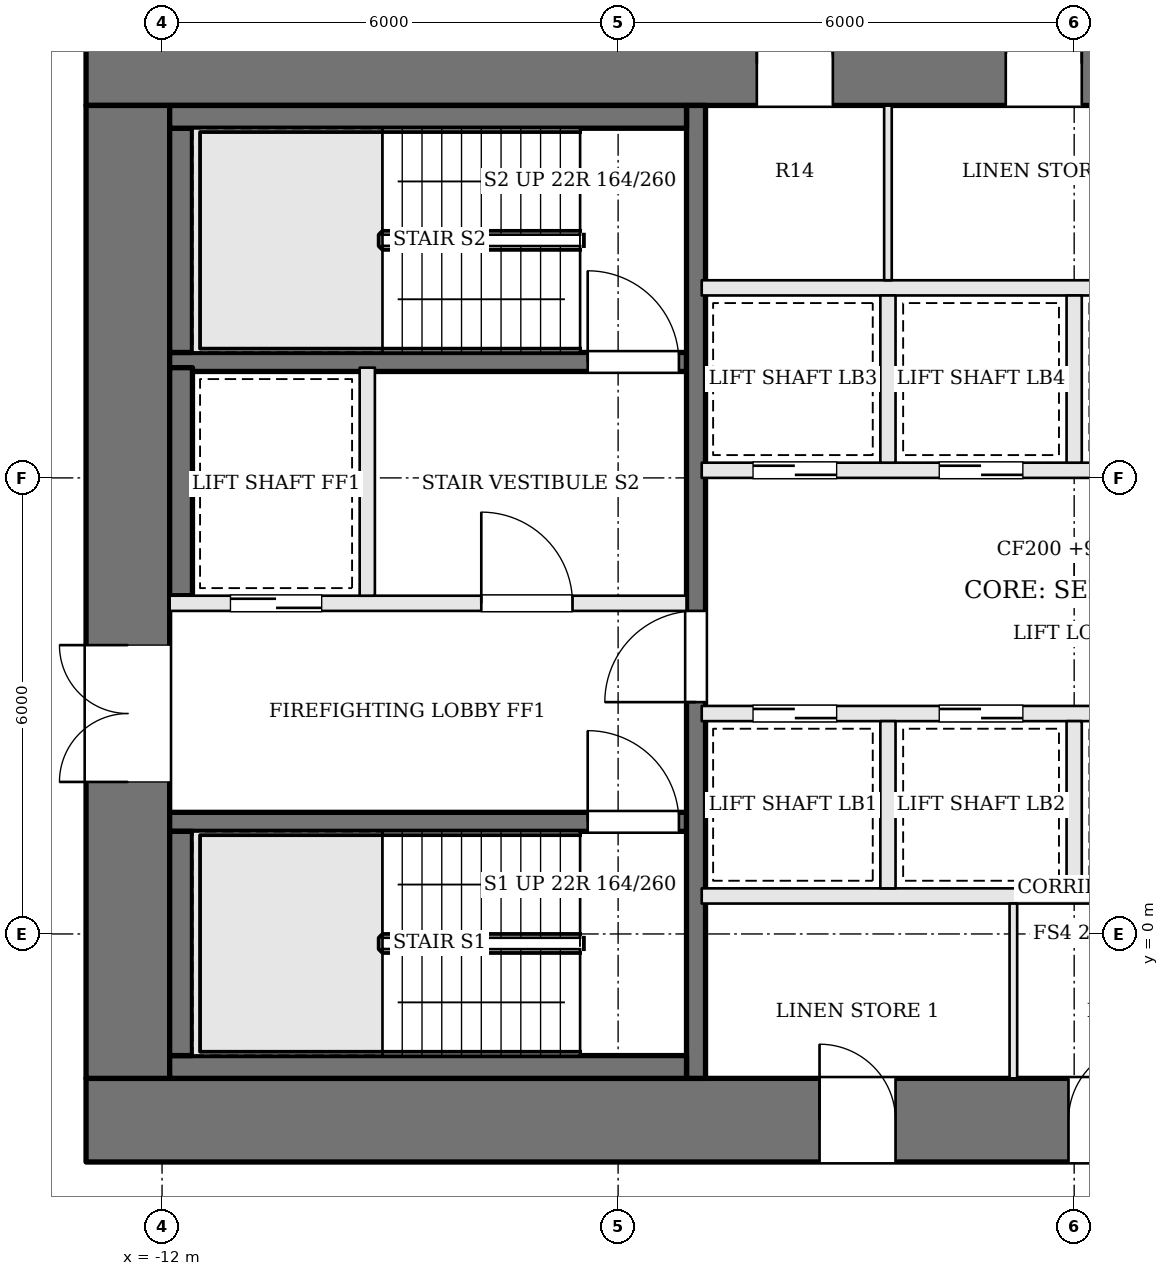
"""IFC4 building model, lengths in metres.
Left out: names, types, materials, properties, quantities, classifications, styles, units other than length and angle.
Written with IfcOpenShell. Run it as: python <this file> out.ifc"""

import sys

from ifc_helpers import new_model, si_unit, direction, frame, frame_2d, origin, place, context, subcontext, project, spatial, rectangle, extrude, element, fill, save


model = new_model("IFC4")
c1 = context("Model", 3, precision=1e-05, world=origin(), true_north=direction((0.0, 1.0)))
c2 = subcontext(c1, "Body", "Model", "MODEL_VIEW")
j1 = project(units=[si_unit("LENGTHUNIT", "METRE"), si_unit("PLANEANGLEUNIT", "RADIAN")], contexts=[c1])
p1 = place(None, origin())
s1 = spatial("IfcSite", under=j1, at=p1, CompositionType="ELEMENT")
p2 = place(p1, origin())
s2 = spatial("IfcBuilding", under=s1, at=p2, CompositionType="ELEMENT")
p3 = place(p2, frame((0.0, 0.0, 99.6)))
s3 = spatial("IfcBuildingStorey", under=s2, at=p3, CompositionType="ELEMENT", Elevation=99.6)
p4 = place(p3, frame((-13.0, 11.45, 0.0), z_axis=(0.0, 0.0, 1.0), x_axis=(1.0, 0.0, 0.0)))
e1 = element("IfcWall", 1, at=p4, inside=s3, PredefinedType="SHEAR", context=c2, shape_type="SweptSolid", body=[
    extrude(rectangle(XDim=26.0, YDim=1.1, at=frame_2d((13.0, 0.0))), origin(), (0.0, 0.0, 1.0), 3.6),
])
p5 = place(p4, frame((8.825, 0.0, 0.0)))
e2 = element("IfcOpeningElement", 2, at=p5, cuts=e1, PredefinedType="OPENING", context=c2, shape_type="SweptSolid", body=[
    extrude(rectangle(XDim=1.0, YDim=2.1, at=frame_2d((0.5, 1.05))), frame((0.0, 0.56, 0.0), z_axis=(0.0, -1.0, 0.0), x_axis=(1.0, 0.0, 0.0)), (0.0, 0.0, 1.0), 1.12),
])
p6 = place(p4, frame((12.1, 0.0, 0.0)))
e3 = element("IfcOpeningElement", 3, at=p6, cuts=e1, PredefinedType="OPENING", context=c2, shape_type="SweptSolid", body=[
    extrude(rectangle(XDim=1.0, YDim=2.1, at=frame_2d((0.5, 1.05))), frame((0.0, 0.56, 0.0), z_axis=(0.0, -1.0, 0.0), x_axis=(1.0, 0.0, 0.0)), (0.0, 0.0, 1.0), 1.12),
])
p7 = place(p4, frame((15.125, 0.0, 0.0)))
e4 = element("IfcOpeningElement", 4, at=p7, cuts=e1, PredefinedType="OPENING", context=c2, shape_type="SweptSolid", body=[
    extrude(rectangle(XDim=0.7, YDim=2.1, at=frame_2d((0.35, 1.05))), frame((0.0, 0.56, 0.0), z_axis=(0.0, -1.0, 0.0), x_axis=(1.0, 0.0, 0.0)), (0.0, 0.0, 1.0), 1.12),
])
p8 = place(p4, frame((16.65, 0.0, 0.0)))
e5 = element("IfcOpeningElement", 5, at=p8, cuts=e1, PredefinedType="OPENING", context=c2, shape_type="SweptSolid", body=[
    extrude(rectangle(XDim=0.9, YDim=2.1, at=frame_2d((0.45, 1.05))), frame((0.0, 0.56, 0.0), z_axis=(0.0, -1.0, 0.0), x_axis=(1.0, 0.0, 0.0)), (0.0, 0.0, 1.0), 1.12),
])
p9 = place(p3, frame((-13.0, -2.45, 0.0), z_axis=(0.0, 0.0, 1.0), x_axis=(1.0, 0.0, 0.0)))
e6 = element("IfcWall", 6, at=p9, inside=s3, PredefinedType="SHEAR", context=c2, shape_type="SweptSolid", body=[
    extrude(rectangle(XDim=26.0, YDim=1.1, at=frame_2d((13.0, 0.0))), origin(), (0.0, 0.0, 1.0), 3.6),
])
p10 = place(p9, frame((9.65, 0.0, 0.0)))
e7 = element("IfcOpeningElement", 7, at=p10, cuts=e6, PredefinedType="OPENING", context=c2, shape_type="SweptSolid", body=[
    extrude(rectangle(XDim=1.0, YDim=2.1, at=frame_2d((0.5, 1.05))), frame((0.0, 0.56, 0.0), z_axis=(0.0, -1.0, 0.0), x_axis=(1.0, 0.0, 0.0)), (0.0, 0.0, 1.0), 1.12),
])
p11 = place(p9, frame((12.925, 0.0, 0.0)))
e8 = element("IfcOpeningElement", 8, at=p11, cuts=e6, PredefinedType="OPENING", context=c2, shape_type="SweptSolid", body=[
    extrude(rectangle(XDim=1.0, YDim=2.1, at=frame_2d((0.5, 1.05))), frame((0.0, 0.56, 0.0), z_axis=(0.0, -1.0, 0.0), x_axis=(1.0, 0.0, 0.0)), (0.0, 0.0, 1.0), 1.12),
])
p12 = place(p9, frame((15.125, 0.0, 0.0)))
e9 = element("IfcOpeningElement", 9, at=p12, cuts=e6, PredefinedType="OPENING", context=c2, shape_type="SweptSolid", body=[
    extrude(rectangle(XDim=0.7, YDim=2.1, at=frame_2d((0.35, 1.05))), frame((0.0, 0.56, 0.0), z_axis=(0.0, -1.0, 0.0), x_axis=(1.0, 0.0, 0.0)), (0.0, 0.0, 1.0), 1.12),
])
p13 = place(p9, frame((16.5, 0.0, 0.0)))
e10 = element("IfcOpeningElement", 10, at=p13, cuts=e6, PredefinedType="OPENING", context=c2, shape_type="SweptSolid", body=[
    extrude(rectangle(XDim=1.0, YDim=2.1, at=frame_2d((0.5, 1.05))), frame((0.0, 0.56, 0.0), z_axis=(0.0, -1.0, 0.0), x_axis=(1.0, 0.0, 0.0)), (0.0, 0.0, 1.0), 1.12),
])
p14 = place(p3, frame((-12.45, -1.9, 0.0), z_axis=(0.0, 0.0, 1.0), x_axis=(0.0, 1.0, 0.0)))
e11 = element("IfcWall", 11, at=p14, inside=s3, PredefinedType="SHEAR", context=c2, shape_type="SweptSolid", body=[
    extrude(rectangle(XDim=12.8, YDim=1.1, at=frame_2d((6.4, 0.0))), origin(), (0.0, 0.0, 1.0), 3.6),
])
p15 = place(p14, frame((3.9, 0.0, 0.0)))
e12 = element("IfcOpeningElement", 12, at=p15, cuts=e11, PredefinedType="OPENING", context=c2, shape_type="SweptSolid", body=[
    extrude(rectangle(XDim=1.8, YDim=2.1, at=frame_2d((0.9, 1.05))), frame((0.0, 0.56, 0.0), z_axis=(0.0, -1.0, 0.0), x_axis=(1.0, 0.0, 0.0)), (0.0, 0.0, 1.0), 1.12),
])
p16 = place(p3, frame((-11.9, 1.475, 0.0), z_axis=(0.0, 0.0, 1.0), x_axis=(1.0, 0.0, 0.0)))
e13 = element("IfcWall", 13, at=p16, inside=s3, PredefinedType="SOLIDWALL", context=c2, shape_type="SweptSolid", body=[
    extrude(rectangle(XDim=6.8, YDim=0.25, at=frame_2d((3.4, 0.0))), origin(), (0.0, 0.0, 1.0), 3.4),
])
p17 = place(p16, frame((5.5, 0.0, 0.0)))
e14 = element("IfcOpeningElement", 14, at=p17, cuts=e13, PredefinedType="OPENING", context=c2, shape_type="SweptSolid", body=[
    extrude(rectangle(XDim=1.2, YDim=2.1, at=frame_2d((0.6, 1.05))), frame((0.0, 0.135, 0.0), z_axis=(0.0, -1.0, 0.0), x_axis=(1.0, 0.0, 0.0)), (0.0, 0.0, 1.0), 0.27),
])
p18 = place(p3, frame((-11.9, 4.35, 0.0), z_axis=(0.0, 0.0, 1.0), x_axis=(1.0, 0.0, 0.0)))
e15 = element("IfcWall", 15, at=p18, inside=s3, PredefinedType="SOLIDWALL", context=c2, shape_type="SweptSolid", body=[
    extrude(rectangle(XDim=6.8, YDim=0.2, at=frame_2d((3.4, 0.0))), origin(), (0.0, 0.0, 1.0), 3.4),
])
p19 = place(p18, frame((4.1, 0.0, 0.0)))
e16 = element("IfcOpeningElement", 16, at=p19, cuts=e15, PredefinedType="OPENING", context=c2, shape_type="SweptSolid", body=[
    extrude(rectangle(XDim=1.2, YDim=2.1, at=frame_2d((0.6, 1.05))), frame((0.0, 0.11, 0.0), z_axis=(0.0, -1.0, 0.0), x_axis=(1.0, 0.0, 0.0)), (0.0, 0.0, 1.0), 0.22),
])
p20 = place(p18, frame((0.8, 0.0, 0.0)))
e17 = element("IfcOpeningElement", 17, at=p20, cuts=e15, PredefinedType="OPENING", context=c2, shape_type="SweptSolid", body=[
    extrude(rectangle(XDim=1.2, YDim=2.1, at=frame_2d((0.6, 1.05))), frame((0.0, 0.11, 0.0), z_axis=(0.0, -1.0, 0.0), x_axis=(1.0, 0.0, 0.0)), (0.0, 0.0, 1.0), 0.22),
])
p21 = place(p3, frame((-11.9, 7.525, 0.0), z_axis=(0.0, 0.0, 1.0), x_axis=(1.0, 0.0, 0.0)))
e18 = element("IfcWall", 18, at=p21, inside=s3, PredefinedType="SOLIDWALL", context=c2, shape_type="SweptSolid", body=[
    extrude(rectangle(XDim=6.8, YDim=0.25, at=frame_2d((3.4, 0.0))), origin(), (0.0, 0.0, 1.0), 3.4),
])
p22 = place(p21, frame((5.5, 0.0, 0.0)))
e19 = element("IfcOpeningElement", 19, at=p22, cuts=e18, PredefinedType="OPENING", context=c2, shape_type="SweptSolid", body=[
    extrude(rectangle(XDim=1.2, YDim=2.1, at=frame_2d((0.6, 1.05))), frame((0.0, 0.135, 0.0), z_axis=(0.0, -1.0, 0.0), x_axis=(1.0, 0.0, 0.0)), (0.0, 0.0, 1.0), 0.27),
])
p23 = place(p3, frame((-9.3, 4.45, 0.0), z_axis=(0.0, 0.0, 1.0), x_axis=(0.0, 1.0, 0.0)))
e20 = element("IfcWall", 20, at=p23, inside=s3, PredefinedType="SOLIDWALL", context=c2, shape_type="SweptSolid", body=[
    extrude(rectangle(XDim=3.0, YDim=0.2, at=frame_2d((1.5, 0.0))), origin(), (0.0, 0.0, 1.0), 3.4),
])
p24 = place(p3, frame((-4.975, -1.9, 0.0), z_axis=(0.0, 0.0, 1.0), x_axis=(0.0, 1.0, 0.0)))
e21 = element("IfcWall", 21, at=p24, inside=s3, PredefinedType="SOLIDWALL", context=c2, shape_type="SweptSolid", body=[
    extrude(rectangle(XDim=12.8, YDim=0.25, at=frame_2d((6.4, 0.0))), origin(), (0.0, 0.0, 1.0), 3.4),
])
p25 = place(p24, frame((4.95, 0.0, 0.0)))
e22 = element("IfcOpeningElement", 22, at=p25, cuts=e21, PredefinedType="OPENING", context=c2, shape_type="SweptSolid", body=[
    extrude(rectangle(XDim=1.2, YDim=2.1, at=frame_2d((0.6, 1.05))), frame((0.0, 0.135, 0.0), z_axis=(0.0, -1.0, 0.0), x_axis=(1.0, 0.0, 0.0)), (0.0, 0.0, 1.0), 0.27),
])
p26 = place(p3, frame((-11.9, -1.75, 0.0), z_axis=(0.0, 0.0, 1.0), x_axis=(1.0, 0.0, 0.0)))
e23 = element("IfcWall", 23, at=p26, inside=s3, PredefinedType="SOLIDWALL", context=c2, shape_type="SweptSolid", body=[
    extrude(rectangle(XDim=6.8, YDim=0.3, at=frame_2d((3.4, 0.0))), origin(), (0.0, 0.0, 1.0), 3.4),
])
p27 = place(p3, frame((-11.75, -1.6, 0.0), z_axis=(0.0, 0.0, 1.0), x_axis=(0.0, 1.0, 0.0)))
e24 = element("IfcWall", 24, at=p27, inside=s3, PredefinedType="SOLIDWALL", context=c2, shape_type="SweptSolid", body=[
    extrude(rectangle(XDim=2.95, YDim=0.3, at=frame_2d((1.475, 0.0))), origin(), (0.0, 0.0, 1.0), 3.4),
])
p28 = place(p3, frame((-11.75, 4.45, 0.0), z_axis=(0.0, 0.0, 1.0), x_axis=(0.0, 1.0, 0.0)))
e25 = element("IfcWall", 25, at=p28, inside=s3, PredefinedType="SOLIDWALL", context=c2, shape_type="SweptSolid", body=[
    extrude(rectangle(XDim=3.0, YDim=0.3, at=frame_2d((1.5, 0.0))), origin(), (0.0, 0.0, 1.0), 3.4),
])
p29 = place(p3, frame((-11.75, 7.65, 0.0), z_axis=(0.0, 0.0, 1.0), x_axis=(0.0, 1.0, 0.0)))
e26 = element("IfcWall", 26, at=p29, inside=s3, PredefinedType="SOLIDWALL", context=c2, shape_type="SweptSolid", body=[
    extrude(rectangle(XDim=2.95, YDim=0.3, at=frame_2d((1.475, 0.0))), origin(), (0.0, 0.0, 1.0), 3.4),
])
p30 = place(p3, frame((-11.9, 10.75, 0.0), z_axis=(0.0, 0.0, 1.0), x_axis=(1.0, 0.0, 0.0)))
e27 = element("IfcWall", 27, at=p30, inside=s3, PredefinedType="SOLIDWALL", context=c2, shape_type="SweptSolid", body=[
    extrude(rectangle(XDim=6.8, YDim=0.3, at=frame_2d((3.4, 0.0))), origin(), (0.0, 0.0, 1.0), 3.4),
])
p31 = place(p3, frame((-4.9, 0.5, 0.0), z_axis=(0.0, 0.0, 1.0), x_axis=(1.0, 0.0, 0.0)))
e28 = element("IfcWall", 28, at=p31, inside=s3, PredefinedType="SOLIDWALL", context=c2, shape_type="SweptSolid", body=[
    extrude(rectangle(XDim=9.8, YDim=0.2, at=frame_2d((4.9, 0.0))), origin(), (0.0, 0.0, 1.0), 3.4),
])
p32 = place(p3, frame((-4.9, 2.9, 0.0), z_axis=(0.0, 0.0, 1.0), x_axis=(1.0, 0.0, 0.0)))
e29 = element("IfcWall", 29, at=p32, inside=s3, PredefinedType="SOLIDWALL", context=c2, shape_type="SweptSolid", body=[
    extrude(rectangle(XDim=9.8, YDim=0.2, at=frame_2d((4.9, 0.0))), origin(), (0.0, 0.0, 1.0), 3.4),
])
p33 = place(p32, frame((0.675, 0.0, 0.0)))
e30 = element("IfcOpeningElement", 30, at=p33, cuts=e29, PredefinedType="OPENING", context=c2, shape_type="SweptSolid", body=[
    extrude(rectangle(XDim=1.1, YDim=2.1, at=frame_2d((0.55, 1.05))), frame((0.0, 0.11, 0.0), z_axis=(0.0, -1.0, 0.0), x_axis=(1.0, 0.0, 0.0)), (0.0, 0.0, 1.0), 0.22),
])
p34 = place(p32, frame((3.125, 0.0, 0.0)))
e31 = element("IfcOpeningElement", 31, at=p34, cuts=e29, PredefinedType="OPENING", context=c2, shape_type="SweptSolid", body=[
    extrude(rectangle(XDim=1.1, YDim=2.1, at=frame_2d((0.55, 1.05))), frame((0.0, 0.11, 0.0), z_axis=(0.0, -1.0, 0.0), x_axis=(1.0, 0.0, 0.0)), (0.0, 0.0, 1.0), 0.22),
])
p35 = place(p3, frame((-4.9, 6.1, 0.0), z_axis=(0.0, 0.0, 1.0), x_axis=(1.0, 0.0, 0.0)))
e32 = element("IfcWall", 32, at=p35, inside=s3, PredefinedType="SOLIDWALL", context=c2, shape_type="SweptSolid", body=[
    extrude(rectangle(XDim=9.8, YDim=0.2, at=frame_2d((4.9, 0.0))), origin(), (0.0, 0.0, 1.0), 3.4),
])
p36 = place(p35, frame((0.675, 0.0, 0.0)))
e33 = element("IfcOpeningElement", 33, at=p36, cuts=e32, PredefinedType="OPENING", context=c2, shape_type="SweptSolid", body=[
    extrude(rectangle(XDim=1.1, YDim=2.1, at=frame_2d((0.55, 1.05))), frame((0.0, 0.11, 0.0), z_axis=(0.0, -1.0, 0.0), x_axis=(1.0, 0.0, 0.0)), (0.0, 0.0, 1.0), 0.22),
])
p37 = place(p35, frame((3.125, 0.0, 0.0)))
e34 = element("IfcOpeningElement", 34, at=p37, cuts=e32, PredefinedType="OPENING", context=c2, shape_type="SweptSolid", body=[
    extrude(rectangle(XDim=1.1, YDim=2.1, at=frame_2d((0.55, 1.05))), frame((0.0, 0.11, 0.0), z_axis=(0.0, -1.0, 0.0), x_axis=(1.0, 0.0, 0.0)), (0.0, 0.0, 1.0), 0.22),
])
p38 = place(p35, frame((5.575, 0.0, 0.0)))
e35 = element("IfcOpeningElement", 35, at=p38, cuts=e32, PredefinedType="OPENING", context=c2, shape_type="SweptSolid", body=[
    extrude(rectangle(XDim=1.1, YDim=2.1, at=frame_2d((0.55, 1.05))), frame((0.0, 0.11, 0.0), z_axis=(0.0, -1.0, 0.0), x_axis=(1.0, 0.0, 0.0)), (0.0, 0.0, 1.0), 0.22),
])
p39 = place(p35, frame((8.025, 0.0, 0.0)))
e36 = element("IfcOpeningElement", 36, at=p39, cuts=e32, PredefinedType="OPENING", context=c2, shape_type="SweptSolid", body=[
    extrude(rectangle(XDim=1.1, YDim=2.1, at=frame_2d((0.55, 1.05))), frame((0.0, 0.11, 0.0), z_axis=(0.0, -1.0, 0.0), x_axis=(1.0, 0.0, 0.0)), (0.0, 0.0, 1.0), 0.22),
])
p40 = place(p3, frame((-4.9, 8.5, 0.0), z_axis=(0.0, 0.0, 1.0), x_axis=(1.0, 0.0, 0.0)))
e37 = element("IfcWall", 37, at=p40, inside=s3, PredefinedType="SOLIDWALL", context=c2, shape_type="SweptSolid", body=[
    extrude(rectangle(XDim=9.8, YDim=0.2, at=frame_2d((4.9, 0.0))), origin(), (0.0, 0.0, 1.0), 3.4),
])
for number, where, z_axis, x_axis in (
    (38, (-2.45, 0.6, 0.0), (0.0, 0.0, 1.0), (0.0, 1.0, 0.0)),
    (39, (0.0, 0.6, 0.0), (0.0, 0.0, 1.0), (0.0, 1.0, 0.0)),
    (40, (-2.45, 6.2, 0.0), (0.0, 0.0, 1.0), (0.0, 1.0, 0.0)),
    (41, (0.0, 6.2, 0.0), (0.0, 0.0, 1.0), (0.0, 1.0, 0.0)),
):
    element("IfcWall", number, at=place(p3, frame(where, z_axis=z_axis, x_axis=x_axis)), inside=s3, PredefinedType="SOLIDWALL", context=c2, shape_type="SweptSolid", body=[
        extrude(rectangle(XDim=2.2, YDim=0.2, at=frame_2d((1.1, 0.0))), origin(), (0.0, 0.0, 1.0), 3.4),
    ])
for number, where, z_axis, x_axis in (
    (42, (-0.8, -1.9, 0.0), (0.0, 0.0, 1.0), (0.0, 1.0, 0.0)),
    (43, (-2.45, 8.6, 0.0), (0.0, 0.0, 1.0), (0.0, 1.0, 0.0)),
):
    element("IfcWall", number, at=place(p3, frame(where, z_axis=z_axis, x_axis=x_axis)), inside=s3, PredefinedType="PARTITIONING", context=c2, shape_type="SweptSolid", body=[
        extrude(rectangle(XDim=2.3, YDim=0.1, at=frame_2d((1.15, 0.0))), origin(), (0.0, 0.0, 1.0), 3.4),
    ])
p41 = place(p15, origin())
e44 = element("IfcDoor", 44, at=p41, inside=s3, OperationType="DOUBLE_DOOR_SINGLE_SWING", PredefinedType="DOOR", context=c2, shape_type="SweptSolid", body=[
    extrude(rectangle(XDim=1.8, YDim=2.1, at=frame_2d((0.9, 1.05))), frame((0.0, 0.025, 0.0), z_axis=(0.0, -1.0, 0.0), x_axis=(1.0, 0.0, 0.0)), (0.0, 0.0, 1.0), 0.05),
])
fill(e12, e44)
p42 = place(p25, origin())
e45 = element("IfcDoor", 45, at=p42, inside=s3, OperationType="SINGLE_SWING_LEFT", PredefinedType="DOOR", context=c2, shape_type="SweptSolid", body=[
    extrude(rectangle(XDim=1.2, YDim=2.1, at=frame_2d((0.6, 1.05))), frame((0.0, 0.025, 0.0), z_axis=(0.0, -1.0, 0.0), x_axis=(1.0, 0.0, 0.0)), (0.0, 0.0, 1.0), 0.05),
])
fill(e22, e45)
p43 = place(p19, origin())
e46 = element("IfcDoor", 46, at=p43, inside=s3, OperationType="SINGLE_SWING_LEFT", PredefinedType="DOOR", context=c2, shape_type="SweptSolid", body=[
    extrude(rectangle(XDim=1.2, YDim=2.1, at=frame_2d((0.6, 1.05))), frame((0.0, 0.025, 0.0), z_axis=(0.0, -1.0, 0.0), x_axis=(1.0, 0.0, 0.0)), (0.0, 0.0, 1.0), 0.05),
])
fill(e16, e46)
p44 = place(p17, origin())
e47 = element("IfcDoor", 47, at=p44, inside=s3, OperationType="SINGLE_SWING_LEFT", PredefinedType="DOOR", context=c2, shape_type="SweptSolid", body=[
    extrude(rectangle(XDim=1.2, YDim=2.1, at=frame_2d((0.6, 1.05))), frame((0.0, 0.025, 0.0), z_axis=(0.0, -1.0, 0.0), x_axis=(1.0, 0.0, 0.0)), (0.0, 0.0, 1.0), 0.05),
])
fill(e14, e47)
p45 = place(p22, origin())
e48 = element("IfcDoor", 48, at=p45, inside=s3, OperationType="SINGLE_SWING_LEFT", PredefinedType="DOOR", context=c2, shape_type="SweptSolid", body=[
    extrude(rectangle(XDim=1.2, YDim=2.1, at=frame_2d((0.6, 1.05))), frame((0.0, 0.025, 0.0), z_axis=(0.0, -1.0, 0.0), x_axis=(1.0, 0.0, 0.0)), (0.0, 0.0, 1.0), 0.05),
])
fill(e19, e48)
p46 = place(p20, origin())
e49 = element("IfcDoor", 49, at=p46, inside=s3, OperationType="SLIDING_TO_RIGHT", PredefinedType="DOOR", context=c2, shape_type="SweptSolid", body=[
    extrude(rectangle(XDim=1.2, YDim=2.1, at=frame_2d((0.6, 1.05))), frame((0.0, 0.025, 0.0), z_axis=(0.0, -1.0, 0.0), x_axis=(1.0, 0.0, 0.0)), (0.0, 0.0, 1.0), 0.05),
])
fill(e17, e49)
p47 = place(p33, origin())
e50 = element("IfcDoor", 50, at=p47, inside=s3, OperationType="SLIDING_TO_RIGHT", PredefinedType="DOOR", context=c2, shape_type="SweptSolid", body=[
    extrude(rectangle(XDim=1.1, YDim=2.1, at=frame_2d((0.55, 1.05))), frame((0.0, 0.025, 0.0), z_axis=(0.0, -1.0, 0.0), x_axis=(1.0, 0.0, 0.0)), (0.0, 0.0, 1.0), 0.05),
])
fill(e30, e50)
p48 = place(p34, origin())
e51 = element("IfcDoor", 51, at=p48, inside=s3, OperationType="SLIDING_TO_LEFT", PredefinedType="DOOR", context=c2, shape_type="SweptSolid", body=[
    extrude(rectangle(XDim=1.1, YDim=2.1, at=frame_2d((0.55, 1.05))), frame((0.0, 0.025, 0.0), z_axis=(0.0, -1.0, 0.0), x_axis=(1.0, 0.0, 0.0)), (0.0, 0.0, 1.0), 0.05),
])
fill(e31, e51)
p49 = place(p36, origin())
e52 = element("IfcDoor", 52, at=p49, inside=s3, OperationType="SLIDING_TO_RIGHT", PredefinedType="DOOR", context=c2, shape_type="SweptSolid", body=[
    extrude(rectangle(XDim=1.1, YDim=2.1, at=frame_2d((0.55, 1.05))), frame((0.0, 0.025, 0.0), z_axis=(0.0, -1.0, 0.0), x_axis=(1.0, 0.0, 0.0)), (0.0, 0.0, 1.0), 0.05),
])
fill(e33, e52)
p50 = place(p37, origin())
e53 = element("IfcDoor", 53, at=p50, inside=s3, OperationType="SLIDING_TO_LEFT", PredefinedType="DOOR", context=c2, shape_type="SweptSolid", body=[
    extrude(rectangle(XDim=1.1, YDim=2.1, at=frame_2d((0.55, 1.05))), frame((0.0, 0.025, 0.0), z_axis=(0.0, -1.0, 0.0), x_axis=(1.0, 0.0, 0.0)), (0.0, 0.0, 1.0), 0.05),
])
fill(e34, e53)
p51 = place(p10, origin())
e54 = element("IfcDoor", 54, at=p51, inside=s3, OperationType="SINGLE_SWING_LEFT", PredefinedType="DOOR", context=c2, shape_type="SweptSolid", body=[
    extrude(rectangle(XDim=1.0, YDim=2.1, at=frame_2d((0.5, 1.05))), frame((0.0, 0.025, 0.0), z_axis=(0.0, -1.0, 0.0), x_axis=(1.0, 0.0, 0.0)), (0.0, 0.0, 1.0), 0.05),
])
fill(e7, e54)
p52 = place(p11, origin())
e55 = element("IfcDoor", 55, at=p52, inside=s3, OperationType="SINGLE_SWING_RIGHT", PredefinedType="DOOR", context=c2, shape_type="SweptSolid", body=[
    extrude(rectangle(XDim=1.0, YDim=2.1, at=frame_2d((0.5, 1.05))), frame((0.0, 0.025, 0.0), z_axis=(0.0, -1.0, 0.0), x_axis=(1.0, 0.0, 0.0)), (0.0, 0.0, 1.0), 0.05),
])
fill(e8, e55)
p53 = place(p5, origin())
e56 = element("IfcDoor", 56, at=p53, inside=s3, OperationType="SINGLE_SWING_LEFT", PredefinedType="DOOR", context=c2, shape_type="SweptSolid", body=[
    extrude(rectangle(XDim=1.0, YDim=2.1, at=frame_2d((0.5, 1.05))), frame((0.0, 0.025, 0.0), z_axis=(0.0, -1.0, 0.0), x_axis=(1.0, 0.0, 0.0)), (0.0, 0.0, 1.0), 0.05),
])
fill(e2, e56)
p54 = place(p6, origin())
e57 = element("IfcDoor", 57, at=p54, inside=s3, OperationType="SINGLE_SWING_RIGHT", PredefinedType="DOOR", context=c2, shape_type="SweptSolid", body=[
    extrude(rectangle(XDim=1.0, YDim=2.1, at=frame_2d((0.5, 1.05))), frame((0.0, 0.025, 0.0), z_axis=(0.0, -1.0, 0.0), x_axis=(1.0, 0.0, 0.0)), (0.0, 0.0, 1.0), 0.05),
])
fill(e3, e57)
save(model, sys.argv[1])
